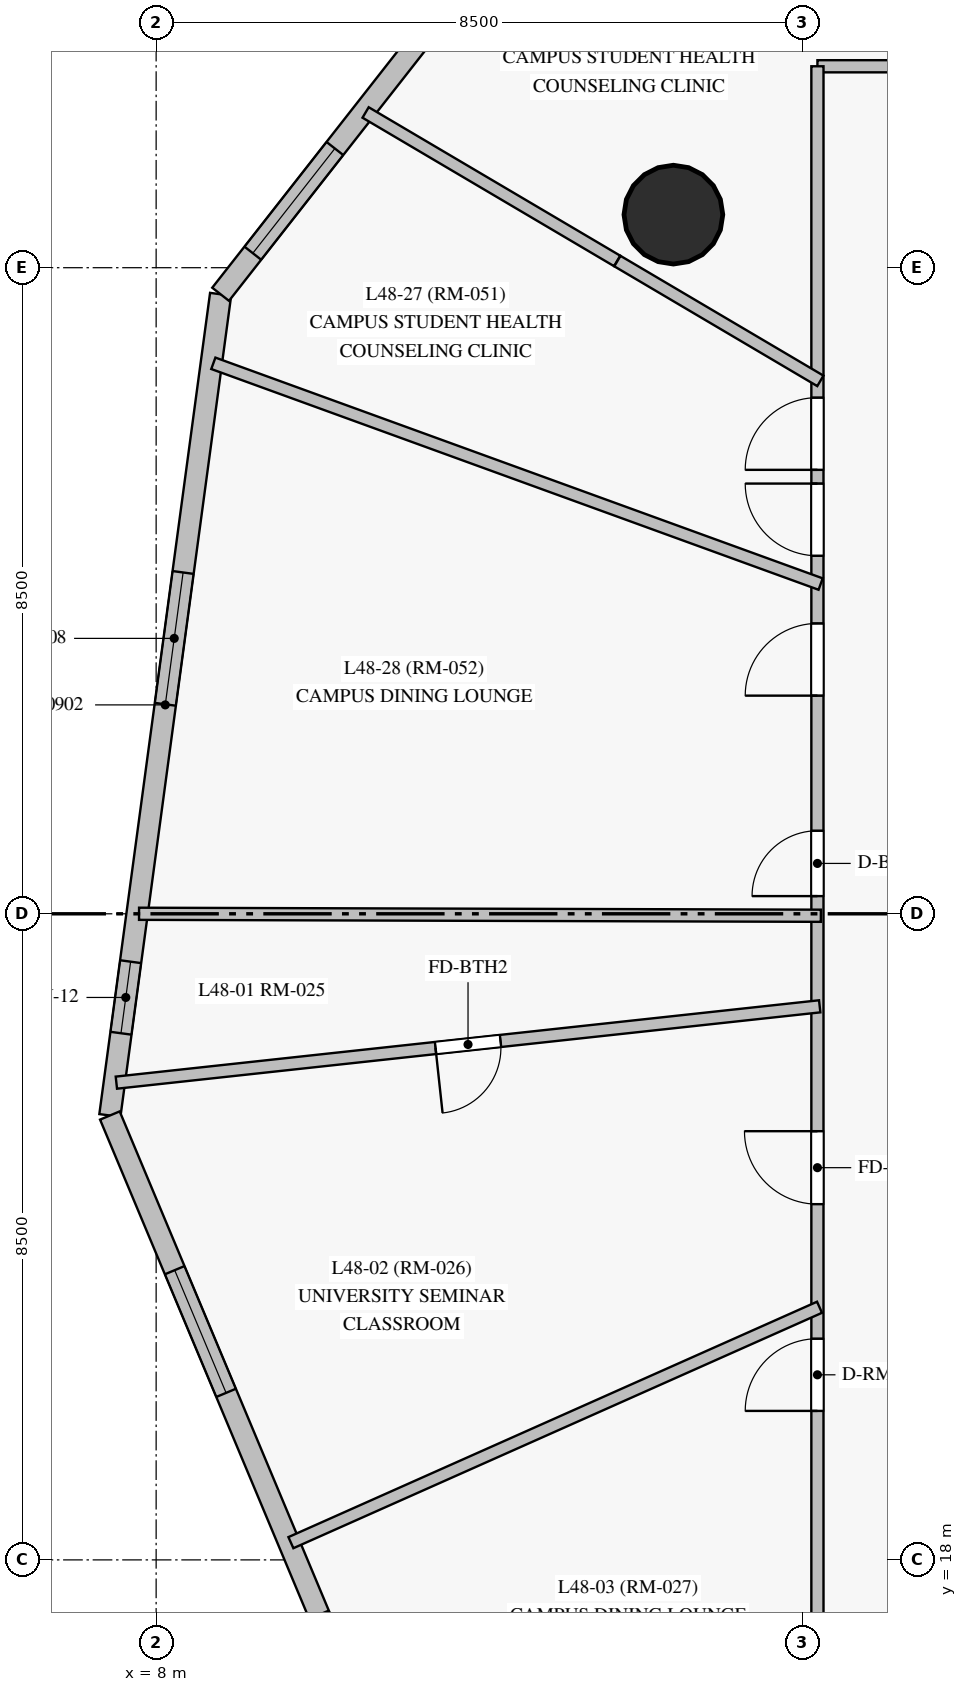
"""IFC4 building model, lengths in metres.
Left out: names, types, materials, properties, quantities, classifications, styles, units other than length and angle.
Written with IfcOpenShell. Run it as: python <this file> out.ifc"""

import sys

from ifc_helpers import new_model, si_unit, direction, frame, frame_2d, origin, origin_with_axes, origin_2d, place, context, subcontext, project, spatial, rectangle, circle, extrude, source, transform, mapped, element, fill, save


model = new_model("IFC4")
c1 = context("Model", 3, precision=1e-05, world=origin(), true_north=direction((0.0, 1.0)))
c2 = subcontext(c1, "Body", "Model", "MODEL_VIEW")
j1 = project(units=[si_unit("LENGTHUNIT", "METRE"), si_unit("PLANEANGLEUNIT", "RADIAN")], contexts=[c1])
p1 = place(None, origin())
s1 = spatial("IfcSite", under=j1, at=p1, CompositionType="ELEMENT")
p2 = place(p1, origin())
s2 = spatial("IfcBuilding", under=s1, at=p2, CompositionType="ELEMENT")
p3 = place(p2, frame((0.0, 0.0, 168.75)))
s3 = spatial("IfcBuildingStorey", under=s2, at=p3, CompositionType="ELEMENT", Elevation=168.75)
m1 = source(origin_with_axes(), c2, "Body", "SweptSolid", [
    extrude(circle(Radius=0.65, at=origin_2d()), origin(), (0.0, 0.0, 1.0), 3.05),
])
p4 = place(p3, frame((14.805, 35.698, 0.0), z_axis=(0.0, 0.0, 1.0), x_axis=(1.0, 0.0, 0.0)))
e1 = element("IfcColumn", 1, at=p4, inside=s3, PredefinedType="COLUMN", context=c2, shape_type="MappedRepresentation", body=[
    mapped(m1, transform((0.0, 0.0, 0.0), scale=1.0)),
])
p5 = place(p3, frame((8.848, 34.65, 0.0), z_axis=(0.0, 0.0, 1.0), x_axis=(-0.133648037214, -0.991028860402, 0.0)))
e2 = element("IfcWall", 2, at=p5, inside=s3, PredefinedType="SOLIDWALL", context=c2, shape_type="SweptSolid", body=[
    extrude(rectangle(XDim=10.902, YDim=0.28, at=frame_2d((5.451, 0.0))), origin(), (0.0, 0.0, 1.0), 2.825),
])
p6 = place(p5, frame((3.693, 0.0, 0.85)))
e3 = element("IfcOpeningElement", 3, at=p6, cuts=e2, PredefinedType="OPENING", context=c2, shape_type="SweptSolid", body=[
    extrude(rectangle(XDim=1.75, YDim=1.65, at=frame_2d((0.875, 0.825))), frame((0.0, 0.15, 0.0), z_axis=(0.0, -1.0, 0.0), x_axis=(1.0, 0.0, 0.0)), (0.0, 0.0, 1.0), 0.3),
])
p7 = place(p5, frame((8.86, 0.0, 0.85)))
e4 = element("IfcOpeningElement", 4, at=p7, cuts=e2, PredefinedType="OPENING", context=c2, shape_type="SweptSolid", body=[
    extrude(rectangle(XDim=0.95, YDim=1.5, at=frame_2d((0.475, 0.75))), frame((0.0, 0.15, 0.0), z_axis=(0.0, -1.0, 0.0), x_axis=(1.0, 0.0, 0.0)), (0.0, 0.0, 1.0), 0.3),
])
p8 = place(p3, frame((7.391, 23.846, 0.0), z_axis=(0.0, 0.0, 1.0), x_axis=(0.386420521241, -0.922322709665, 0.0)))
e5 = element("IfcWall", 5, at=p8, inside=s3, PredefinedType="SOLIDWALL", context=c2, shape_type="SweptSolid", body=[
    extrude(rectangle(XDim=13.718, YDim=0.28, at=frame_2d((6.859, 0.0))), origin(), (0.0, 0.0, 1.0), 2.825),
])
p9 = place(p8, frame((2.206, 0.0, 0.85)))
e6 = element("IfcOpeningElement", 6, at=p9, cuts=e5, PredefinedType="OPENING", context=c2, shape_type="SweptSolid", body=[
    extrude(rectangle(XDim=1.75, YDim=1.65, at=frame_2d((0.875, 0.825))), frame((0.0, 0.15, 0.0), z_axis=(0.0, -1.0, 0.0), x_axis=(1.0, 0.0, 0.0)), (0.0, 0.0, 1.0), 0.3),
])
p10 = place(p8, frame((7.121, 0.0, 0.85)))
e7 = element("IfcOpeningElement", 7, at=p10, cuts=e5, PredefinedType="OPENING", context=c2, shape_type="SweptSolid", body=[
    extrude(rectangle(XDim=1.75, YDim=1.65, at=frame_2d((0.875, 0.825))), frame((0.0, 0.15, 0.0), z_axis=(0.0, -1.0, 0.0), x_axis=(1.0, 0.0, 0.0)), (0.0, 0.0, 1.0), 0.3),
])
p11 = place(p8, frame((11.638, 0.0, 0.85)))
e8 = element("IfcOpeningElement", 8, at=p11, cuts=e5, PredefinedType="OPENING", context=c2, shape_type="SweptSolid", body=[
    extrude(rectangle(XDim=1.55, YDim=1.65, at=frame_2d((0.775, 0.825))), frame((0.0, 0.15, 0.0), z_axis=(0.0, -1.0, 0.0), x_axis=(1.0, 0.0, 0.0)), (0.0, 0.0, 1.0), 0.3),
])
p12 = place(p3, frame((17.311, 45.447, 0.0), z_axis=(0.0, 0.0, 1.0), x_axis=(-0.616918014759, -0.787027422054, 0.0)))
e9 = element("IfcWall", 9, at=p12, inside=s3, PredefinedType="SOLIDWALL", context=c2, shape_type="SweptSolid", body=[
    extrude(rectangle(XDim=13.718, YDim=0.28, at=frame_2d((6.859, 0.0))), origin(), (0.0, 0.0, 1.0), 2.825),
])
p13 = place(p12, frame((0.726, 0.0, 0.85)))
e10 = element("IfcOpeningElement", 10, at=p13, cuts=e9, PredefinedType="OPENING", context=c2, shape_type="SweptSolid", body=[
    extrude(rectangle(XDim=1.75, YDim=1.65, at=frame_2d((0.875, 0.825))), frame((0.0, 0.15, 0.0), z_axis=(0.0, -1.0, 0.0), x_axis=(1.0, 0.0, 0.0)), (0.0, 0.0, 1.0), 0.3),
])
p14 = place(p12, frame((4.305, 0.0, 0.85)))
e11 = element("IfcOpeningElement", 11, at=p14, cuts=e9, PredefinedType="OPENING", context=c2, shape_type="SweptSolid", body=[
    extrude(rectangle(XDim=1.75, YDim=1.65, at=frame_2d((0.875, 0.825))), frame((0.0, 0.15, 0.0), z_axis=(0.0, -1.0, 0.0), x_axis=(1.0, 0.0, 0.0)), (0.0, 0.0, 1.0), 0.3),
])
p15 = place(p12, frame((7.741, 0.0, 0.85)))
e12 = element("IfcOpeningElement", 12, at=p15, cuts=e9, PredefinedType="OPENING", context=c2, shape_type="SweptSolid", body=[
    extrude(rectangle(XDim=1.75, YDim=1.65, at=frame_2d((0.875, 0.825))), frame((0.0, 0.15, 0.0), z_axis=(0.0, -1.0, 0.0), x_axis=(1.0, 0.0, 0.0)), (0.0, 0.0, 1.0), 0.3),
])
p16 = place(p12, frame((11.281, 0.0, 0.85)))
e13 = element("IfcOpeningElement", 13, at=p16, cuts=e9, PredefinedType="OPENING", context=c2, shape_type="SweptSolid", body=[
    extrude(rectangle(XDim=1.75, YDim=1.65, at=frame_2d((0.875, 0.825))), frame((0.0, 0.15, 0.0), z_axis=(0.0, -1.0, 0.0), x_axis=(1.0, 0.0, 0.0)), (0.0, 0.0, 1.0), 0.3),
])
p17 = place(p3, frame((16.7, 37.65, 0.0), z_axis=(0.0, 0.0, 1.0), x_axis=(1.0, 0.0, 0.0)))
e14 = element("IfcWall", 14, at=p17, inside=s3, PredefinedType="PARTITIONING", context=c2, shape_type="SweptSolid", body=[
    extrude(rectangle(XDim=23.5, YDim=0.16, at=frame_2d((11.75, 0.0))), origin(), (0.0, 0.0, 1.0), 2.375),
])
p18 = place(p17, frame((20.632, 0.0, 0.0)))
e15 = element("IfcOpeningElement", 15, at=p18, cuts=e14, PredefinedType="OPENING", context=c2, shape_type="SweptSolid", body=[
    extrude(rectangle(XDim=0.95, YDim=2.15, at=frame_2d((0.475, 1.075))), frame((0.0, 0.09, 0.0), z_axis=(0.0, -1.0, 0.0), x_axis=(1.0, 0.0, 0.0)), (0.0, 0.0, 1.0), 0.18),
])
p19 = place(p17, frame((17.34, 0.0, 0.0)))
e16 = element("IfcOpeningElement", 16, at=p19, cuts=e14, PredefinedType="OPENING", context=c2, shape_type="SweptSolid", body=[
    extrude(rectangle(XDim=0.95, YDim=2.15, at=frame_2d((0.475, 1.075))), frame((0.0, 0.09, 0.0), z_axis=(0.0, -1.0, 0.0), x_axis=(1.0, 0.0, 0.0)), (0.0, 0.0, 1.0), 0.18),
])
p20 = place(p17, frame((15.24, 0.0, 0.0)))
e17 = element("IfcOpeningElement", 17, at=p20, cuts=e14, PredefinedType="OPENING", context=c2, shape_type="SweptSolid", body=[
    extrude(rectangle(XDim=0.95, YDim=2.15, at=frame_2d((0.475, 1.075))), frame((0.0, 0.09, 0.0), z_axis=(0.0, -1.0, 0.0), x_axis=(1.0, 0.0, 0.0)), (0.0, 0.0, 1.0), 0.18),
])
p21 = place(p17, frame((13.482, 0.0, 0.0)))
e18 = element("IfcOpeningElement", 18, at=p21, cuts=e14, PredefinedType="OPENING", context=c2, shape_type="SweptSolid", body=[
    extrude(rectangle(XDim=0.95, YDim=2.15, at=frame_2d((0.475, 1.075))), frame((0.0, 0.09, 0.0), z_axis=(0.0, -1.0, 0.0), x_axis=(1.0, 0.0, 0.0)), (0.0, 0.0, 1.0), 0.18),
])
p22 = place(p17, frame((11.365, 0.0, 0.0)))
e19 = element("IfcOpeningElement", 19, at=p22, cuts=e14, PredefinedType="OPENING", context=c2, shape_type="SweptSolid", body=[
    extrude(rectangle(XDim=0.95, YDim=2.15, at=frame_2d((0.475, 1.075))), frame((0.0, 0.09, 0.0), z_axis=(0.0, -1.0, 0.0), x_axis=(1.0, 0.0, 0.0)), (0.0, 0.0, 1.0), 0.18),
])
p23 = place(p17, frame((9.588, 0.0, 0.0)))
e20 = element("IfcOpeningElement", 20, at=p23, cuts=e14, PredefinedType="OPENING", context=c2, shape_type="SweptSolid", body=[
    extrude(rectangle(XDim=0.95, YDim=2.15, at=frame_2d((0.475, 1.075))), frame((0.0, 0.09, 0.0), z_axis=(0.0, -1.0, 0.0), x_axis=(1.0, 0.0, 0.0)), (0.0, 0.0, 1.0), 0.18),
])
p24 = place(p17, frame((7.75, 0.0, 0.0)))
e21 = element("IfcOpeningElement", 21, at=p24, cuts=e14, PredefinedType="OPENING", context=c2, shape_type="SweptSolid", body=[
    extrude(rectangle(XDim=0.95, YDim=2.15, at=frame_2d((0.475, 1.075))), frame((0.0, 0.09, 0.0), z_axis=(0.0, -1.0, 0.0), x_axis=(1.0, 0.0, 0.0)), (0.0, 0.0, 1.0), 0.18),
])
p25 = place(p17, frame((5.4, 0.0, 0.0)))
e22 = element("IfcOpeningElement", 22, at=p25, cuts=e14, PredefinedType="OPENING", context=c2, shape_type="SweptSolid", body=[
    extrude(rectangle(XDim=0.95, YDim=2.15, at=frame_2d((0.475, 1.075))), frame((0.0, 0.09, 0.0), z_axis=(0.0, -1.0, 0.0), x_axis=(1.0, 0.0, 0.0)), (0.0, 0.0, 1.0), 0.18),
])
p26 = place(p17, frame((1.277, 0.0, 0.0)))
e23 = element("IfcOpeningElement", 23, at=p26, cuts=e14, PredefinedType="OPENING", context=c2, shape_type="SweptSolid", body=[
    extrude(rectangle(XDim=0.86, YDim=2.04, at=frame_2d((0.43, 1.02))), frame((0.0, 0.09, 0.0), z_axis=(0.0, -1.0, 0.0), x_axis=(1.0, 0.0, 0.0)), (0.0, 0.0, 1.0), 0.18),
])
p27 = place(p3, frame((16.7, 15.35, 0.0), z_axis=(0.0, 0.0, 1.0), x_axis=(0.0, 1.0, 0.0)))
e24 = element("IfcWall", 24, at=p27, inside=s3, PredefinedType="PARTITIONING", context=c2, shape_type="SweptSolid", body=[
    extrude(rectangle(XDim=22.3, YDim=0.16, at=frame_2d((11.15, 0.0))), origin(), (0.0, 0.0, 1.0), 2.275),
])
p28 = place(p27, frame((11.383, 0.0, 0.0)))
e25 = element("IfcOpeningElement", 25, at=p28, cuts=e24, PredefinedType="OPENING", context=c2, shape_type="SweptSolid", body=[
    extrude(rectangle(XDim=0.86, YDim=2.1, at=frame_2d((0.43, 1.05))), frame((0.0, 0.09, 0.0), z_axis=(0.0, -1.0, 0.0), x_axis=(1.0, 0.0, 0.0)), (0.0, 0.0, 1.0), 0.18),
])
p29 = place(p27, frame((7.33, 0.0, 0.0)))
e26 = element("IfcOpeningElement", 26, at=p29, cuts=e24, PredefinedType="OPENING", context=c2, shape_type="SweptSolid", body=[
    extrude(rectangle(XDim=0.96, YDim=2.15, at=frame_2d((0.48, 1.075))), frame((0.0, 0.09, 0.0), z_axis=(0.0, -1.0, 0.0), x_axis=(1.0, 0.0, 0.0)), (0.0, 0.0, 1.0), 0.18),
])
p30 = place(p27, frame((4.61, 0.0, 0.0)))
e27 = element("IfcOpeningElement", 27, at=p30, cuts=e24, PredefinedType="OPENING", context=c2, shape_type="SweptSolid", body=[
    extrude(rectangle(XDim=0.95, YDim=2.15, at=frame_2d((0.475, 1.075))), frame((0.0, 0.09, 0.0), z_axis=(0.0, -1.0, 0.0), x_axis=(1.0, 0.0, 0.0)), (0.0, 0.0, 1.0), 0.18),
])
p31 = place(p27, frame((16.99, 0.0, 0.0)))
e28 = element("IfcOpeningElement", 28, at=p31, cuts=e24, PredefinedType="OPENING", context=c2, shape_type="SweptSolid", body=[
    extrude(rectangle(XDim=0.95, YDim=2.15, at=frame_2d((0.475, 1.075))), frame((0.0, 0.09, 0.0), z_axis=(0.0, -1.0, 0.0), x_axis=(1.0, 0.0, 0.0)), (0.0, 0.0, 1.0), 0.18),
])
p32 = place(p27, frame((15.86, 0.0, 0.0)))
e29 = element("IfcOpeningElement", 29, at=p32, cuts=e24, PredefinedType="OPENING", context=c2, shape_type="SweptSolid", body=[
    extrude(rectangle(XDim=0.95, YDim=2.15, at=frame_2d((0.475, 1.075))), frame((0.0, 0.09, 0.0), z_axis=(0.0, -1.0, 0.0), x_axis=(1.0, 0.0, 0.0)), (0.0, 0.0, 1.0), 0.18),
])
p33 = place(p27, frame((14.02, 0.0, 0.0)))
e30 = element("IfcOpeningElement", 30, at=p33, cuts=e24, PredefinedType="OPENING", context=c2, shape_type="SweptSolid", body=[
    extrude(rectangle(XDim=0.95, YDim=2.15, at=frame_2d((0.475, 1.075))), frame((0.0, 0.09, 0.0), z_axis=(0.0, -1.0, 0.0), x_axis=(1.0, 0.0, 0.0)), (0.0, 0.0, 1.0), 0.18),
])
p34 = place(p3, frame((16.73, 25.283, 0.0), z_axis=(0.0, 0.0, 1.0), x_axis=(-0.994162948794, -0.107888976475, 0.0)))
e31 = element("IfcWall", 31, at=p34, inside=s3, PredefinedType="PARTITIONING", context=c2, shape_type="SweptSolid", body=[
    extrude(rectangle(XDim=9.307, YDim=0.16, at=frame_2d((4.654, 0.0))), origin(), (0.0, 0.0, 1.0), 2.825),
])
p35 = place(p34, frame((4.224, 0.0, 0.0)))
e32 = element("IfcOpeningElement", 32, at=p35, cuts=e31, PredefinedType="OPENING", context=c2, shape_type="SweptSolid", body=[
    extrude(rectangle(XDim=0.86, YDim=2.04, at=frame_2d((0.43, 1.02))), frame((0.0, 0.09, 0.0), z_axis=(0.0, -1.0, 0.0), x_axis=(1.0, 0.0, 0.0)), (0.0, 0.0, 1.0), 0.18),
])
p36 = place(p3, frame((7.775, 26.5, 0.0), z_axis=(0.0, 0.0, 1.0), x_axis=(0.999995759346, -0.002912265487, 0.0)))
e33 = element("IfcWall", 33, at=p36, inside=s3, PredefinedType="PARTITIONING", context=c2, shape_type="SweptSolid", body=[
    extrude(rectangle(XDim=8.97, YDim=0.16, at=frame_2d((4.485, 0.0))), origin(), (0.0, 0.0, 1.0), 2.825),
])
p37 = place(p3, frame((16.742, 30.838, 0.0), z_axis=(0.0, 0.0, 1.0), x_axis=(-0.939833664455, 0.341632380137, 0.0)))
e34 = element("IfcWall", 34, at=p37, inside=s3, PredefinedType="PARTITIONING", context=c2, shape_type="SweptSolid", body=[
    extrude(rectangle(XDim=8.501, YDim=0.16, at=frame_2d((4.25, 0.0))), origin(), (0.0, 0.0, 1.0), 2.825),
])
p38 = place(p3, frame((16.727, 21.323, 0.0), z_axis=(0.0, 0.0, 1.0), x_axis=(-0.913525664491, -0.406781096311, 0.0)))
e35 = element("IfcWall", 35, at=p38, inside=s3, PredefinedType="PARTITIONING", context=c2, shape_type="SweptSolid", body=[
    extrude(rectangle(XDim=7.613, YDim=0.16, at=frame_2d((3.806, 0.0))), origin(), (0.0, 0.0, 1.0), 2.825),
])
p39 = place(p3, frame((19.68, 37.615, 0.0), z_axis=(0.0, 0.0, 1.0), x_axis=(-0.624925342078, 0.780684518118, 0.0)))
e36 = element("IfcWall", 36, at=p39, inside=s3, PredefinedType="PARTITIONING", context=c2, shape_type="SweptSolid", body=[
    extrude(rectangle(XDim=6.851, YDim=0.16, at=frame_2d((3.426, 0.0))), origin(), (0.0, 0.0, 1.0), 2.825),
])
p40 = place(p3, frame((14.065, 35.089, 0.0), z_axis=(0.0, 0.0, 1.0), x_axis=(-0.861198344714, 0.508269034136, 0.0)))
e37 = element("IfcWall", 37, at=p40, inside=s3, PredefinedType="PARTITIONING", context=c2, shape_type="SweptSolid", body=[
    extrude(rectangle(XDim=3.843, YDim=0.16, at=frame_2d((1.921, 0.0))), origin(), (0.0, 0.0, 1.0), 2.825),
])
p41 = place(p3, frame((16.739, 33.511, 0.0), z_axis=(0.0, 0.0, 1.0), x_axis=(-0.861200683606, 0.508265071155, 0.0)))
e38 = element("IfcWall", 38, at=p41, inside=s3, PredefinedType="PARTITIONING", context=c2, shape_type="SweptSolid", body=[
    extrude(rectangle(XDim=3.101, YDim=0.16, at=frame_2d((1.551, 0.0))), origin(), (0.0, 0.0, 1.0), 2.825),
])
m2 = source(origin_with_axes(), c2, "Body", "SweptSolid", [
    extrude(rectangle(XDim=1.75, YDim=1.65, at=frame_2d((0.875, 0.825))), frame((0.0, 0.03, 0.0), z_axis=(0.0, -1.0, 0.0), x_axis=(1.0, 0.0, 0.0)), (0.0, 0.0, 1.0), 0.06),
])
p42 = place(p6, origin())
e39 = element("IfcWindow", 39, at=p42, inside=s3, PartitioningType="SINGLE_PANEL", PredefinedType="WINDOW", context=c2, shape_type="MappedRepresentation", body=[
    mapped(m2, transform((0.0, 0.0, 0.0), scale=1.0)),
])
fill(e3, e39)
m3 = source(origin_with_axes(), c2, "Body", "SweptSolid", [
    extrude(rectangle(XDim=0.95, YDim=1.5, at=frame_2d((0.475, 0.75))), frame((0.0, 0.03, 0.0), z_axis=(0.0, -1.0, 0.0), x_axis=(1.0, 0.0, 0.0)), (0.0, 0.0, 1.0), 0.06),
])
p43 = place(p7, origin())
e40 = element("IfcWindow", 40, at=p43, inside=s3, PartitioningType="SINGLE_PANEL", PredefinedType="WINDOW", context=c2, shape_type="MappedRepresentation", body=[
    mapped(m3, transform((0.0, 0.0, 0.0), scale=1.0)),
])
fill(e4, e40)
p44 = place(p9, origin())
e41 = element("IfcWindow", 41, at=p44, inside=s3, PartitioningType="SINGLE_PANEL", PredefinedType="WINDOW", context=c2, shape_type="MappedRepresentation", body=[
    mapped(m2, transform((0.0, 0.0, 0.0), scale=1.0)),
])
fill(e6, e41)
p45 = place(p16, origin())
e42 = element("IfcWindow", 42, at=p45, inside=s3, PartitioningType="SINGLE_PANEL", PredefinedType="WINDOW", context=c2, shape_type="MappedRepresentation", body=[
    mapped(m2, transform((0.0, 0.0, 0.0), scale=1.0)),
])
fill(e13, e42)
m4 = source(origin_with_axes(), c2, "Body", "SweptSolid", [
    extrude(rectangle(XDim=0.86, YDim=2.1, at=frame_2d((0.43, 1.05))), frame((0.0, 0.025, 0.0), z_axis=(0.0, -1.0, 0.0), x_axis=(1.0, 0.0, 0.0)), (0.0, 0.0, 1.0), 0.05),
])
p46 = place(p28, origin())
e43 = element("IfcDoor", 43, at=p46, inside=s3, OperationType="SINGLE_SWING_LEFT", PredefinedType="DOOR", context=c2, shape_type="MappedRepresentation", body=[
    mapped(m4, transform((0.0, 0.0, 0.0), scale=1.0)),
])
fill(e25, e43)
m5 = source(origin_with_axes(), c2, "Body", "SweptSolid", [
    extrude(rectangle(XDim=0.96, YDim=2.15, at=frame_2d((0.48, 1.075))), frame((0.0, 0.025, 0.0), z_axis=(0.0, -1.0, 0.0), x_axis=(1.0, 0.0, 0.0)), (0.0, 0.0, 1.0), 0.05),
])
p47 = place(p29, origin())
e44 = element("IfcDoor", 44, at=p47, inside=s3, OperationType="SINGLE_SWING_RIGHT", PredefinedType="DOOR", context=c2, shape_type="MappedRepresentation", body=[
    mapped(m5, transform((0.0, 0.0, 0.0), scale=1.0)),
])
fill(e26, e44)
m6 = source(origin_with_axes(), c2, "Body", "SweptSolid", [
    extrude(rectangle(XDim=0.95, YDim=2.15, at=frame_2d((0.475, 1.075))), frame((0.0, 0.025, 0.0), z_axis=(0.0, -1.0, 0.0), x_axis=(1.0, 0.0, 0.0)), (0.0, 0.0, 1.0), 0.05),
])
p48 = place(p30, origin())
e45 = element("IfcDoor", 45, at=p48, inside=s3, OperationType="SINGLE_SWING_LEFT", PredefinedType="DOOR", context=c2, shape_type="MappedRepresentation", body=[
    mapped(m6, transform((0.0, 0.0, 0.0), scale=1.0)),
])
fill(e27, e45)
p49 = place(p31, origin())
e46 = element("IfcDoor", 46, at=p49, inside=s3, OperationType="SINGLE_SWING_LEFT", PredefinedType="DOOR", context=c2, shape_type="MappedRepresentation", body=[
    mapped(m6, transform((0.0, 0.0, 0.0), scale=1.0)),
])
fill(e28, e46)
p50 = place(p32, origin())
e47 = element("IfcDoor", 47, at=p50, inside=s3, OperationType="SINGLE_SWING_RIGHT", PredefinedType="DOOR", context=c2, shape_type="MappedRepresentation", body=[
    mapped(m6, transform((0.0, 0.0, 0.0), scale=1.0)),
])
fill(e29, e47)
p51 = place(p33, origin())
e48 = element("IfcDoor", 48, at=p51, inside=s3, OperationType="SINGLE_SWING_LEFT", PredefinedType="DOOR", context=c2, shape_type="MappedRepresentation", body=[
    mapped(m6, transform((0.0, 0.0, 0.0), scale=1.0)),
])
fill(e30, e48)
m7 = source(origin_with_axes(), c2, "Body", "SweptSolid", [
    extrude(rectangle(XDim=0.86, YDim=2.04, at=frame_2d((0.43, 1.02))), frame((0.0, 0.025, 0.0), z_axis=(0.0, -1.0, 0.0), x_axis=(1.0, 0.0, 0.0)), (0.0, 0.0, 1.0), 0.05),
])
p52 = place(p35, origin())
e49 = element("IfcDoor", 49, at=p52, inside=s3, OperationType="SINGLE_SWING_RIGHT", PredefinedType="DOOR", context=c2, shape_type="MappedRepresentation", body=[
    mapped(m7, transform((0.0, 0.0, 0.0), scale=1.0)),
])
fill(e32, e49)
save(model, sys.argv[1])
